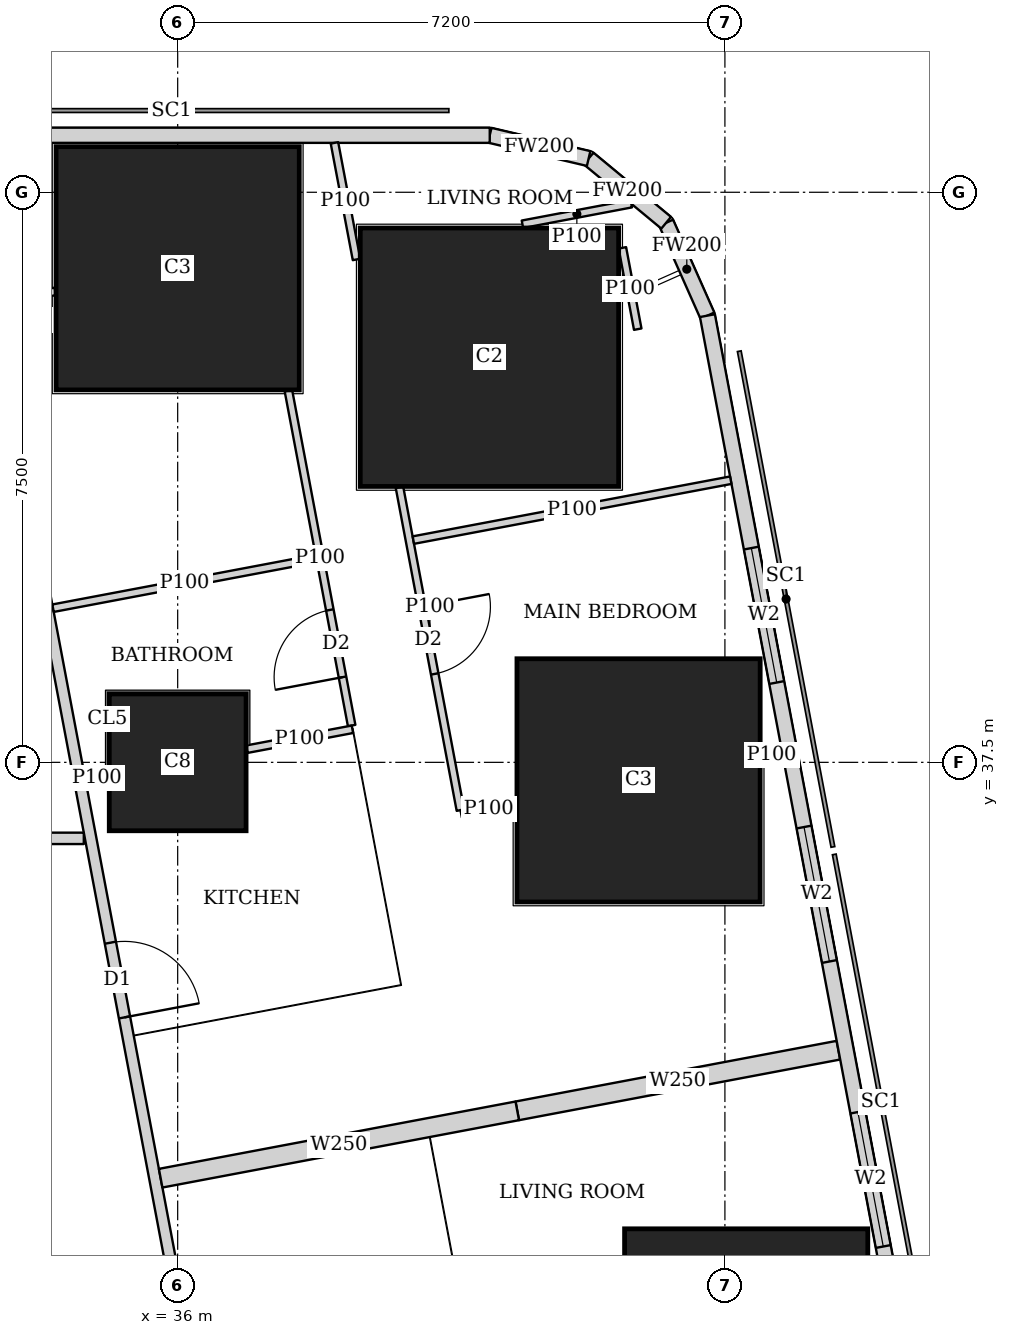
"""IFC4 building model, lengths in metres.
Left out: names, types, materials, properties, quantities, classifications, styles, units other than length and angle.
Written with IfcOpenShell. Run it as: python <this file> out.ifc"""

import sys

from ifc_helpers import new_model, si_unit, direction, frame, frame_2d, origin, origin_2d, place, context, subcontext, project, spatial, rectangle, extrude, element, fill, save


model = new_model("IFC4")
c1 = context("Model", 3, precision=1e-05, world=origin(), true_north=direction((0.0, 1.0)))
c2 = subcontext(c1, "Body", "Model", "MODEL_VIEW")
j1 = project(units=[si_unit("LENGTHUNIT", "METRE"), si_unit("PLANEANGLEUNIT", "RADIAN")], contexts=[c1])
p1 = place(None, origin())
s1 = spatial("IfcSite", under=j1, at=p1, CompositionType="ELEMENT")
p2 = place(p1, origin())
s2 = spatial("IfcBuilding", under=s1, at=p2, CompositionType="ELEMENT")
p3 = place(p2, frame((0.0, 0.0, 23.75)))
s3 = spatial("IfcBuildingStorey", under=s2, at=p3, CompositionType="ELEMENT", Elevation=23.75)
p4 = place(p3, frame((43.48, 29.763, 0.0), z_axis=(0.0, 0.0, 1.0), x_axis=(1.0, 0.0, 0.0)))
e1 = element("IfcColumn", 1, at=p4, inside=s3, PredefinedType="COLUMN", context=c2, shape_type="SweptSolid", body=[
    extrude(rectangle(XDim=3.2, YDim=3.2, at=origin_2d()), origin(), (0.0, 0.0, 1.0), 3.75),
])
p5 = place(p3, frame((36.0, 37.5, 0.0), z_axis=(0.0, 0.0, 1.0), x_axis=(1.0, 0.0, 0.0)))
e2 = element("IfcColumn", 2, at=p5, inside=s3, PredefinedType="COLUMN", context=c2, shape_type="SweptSolid", body=[
    extrude(rectangle(XDim=1.8, YDim=1.8, at=origin_2d()), origin(), (0.0, 0.0, 1.0), 3.75),
])
p6 = place(p3, frame((42.064, 37.263, 0.0), z_axis=(0.0, 0.0, 1.0), x_axis=(1.0, 0.0, 0.0)))
e3 = element("IfcColumn", 3, at=p6, inside=s3, PredefinedType="COLUMN", context=c2, shape_type="SweptSolid", body=[
    extrude(rectangle(XDim=3.2, YDim=3.2, at=origin_2d()), origin(), (0.0, 0.0, 1.0), 3.75),
])
p7 = place(p3, frame((40.102, 42.83, 0.0), z_axis=(0.0, 0.0, 1.0), x_axis=(1.0, 0.0, 0.0)))
e4 = element("IfcColumn", 4, at=p7, inside=s3, PredefinedType="COLUMN", context=c2, shape_type="SweptSolid", body=[
    extrude(rectangle(XDim=3.4, YDim=3.4, at=origin_2d()), origin(), (0.0, 0.0, 1.0), 3.75),
])
p8 = place(p3, frame((36.0, 44.0, 0.0), z_axis=(0.0, 0.0, 1.0), x_axis=(1.0, 0.0, 0.0)))
e5 = element("IfcColumn", 5, at=p8, inside=s3, PredefinedType="COLUMN", context=c2, shape_type="SweptSolid", body=[
    extrude(rectangle(XDim=3.2, YDim=3.2, at=origin_2d()), origin(), (0.0, 0.0, 1.0), 3.75),
])
p9 = place(p3, frame((50.653, 2.703, 0.0), z_axis=(0.0, 0.0, 1.0), x_axis=(-0.185612026696, 0.982623109613, 0.0)))
e6 = element("IfcWall", 6, at=p9, inside=s3, PredefinedType="SOLIDWALL", context=c2, shape_type="SweptSolid", body=[
    extrude(rectangle(XDim=41.393, YDim=0.2, at=frame_2d((20.697, 0.0))), origin(), (0.0, 0.0, 1.0), 3.5),
])
p10 = place(p9, frame((1.633, 0.0, 0.9)))
e7 = element("IfcOpeningElement", 7, at=p10, cuts=e6, PredefinedType="OPENING", context=c2, shape_type="SweptSolid", body=[
    extrude(rectangle(XDim=1.8, YDim=1.5, at=frame_2d((0.9, 0.75))), frame((0.0, 0.11, 0.0), z_axis=(0.0, -1.0, 0.0), x_axis=(1.0, 0.0, 0.0)), (0.0, 0.0, 1.0), 0.22),
])
p11 = place(p9, frame((6.032, 0.0, 0.9)))
e8 = element("IfcOpeningElement", 8, at=p11, cuts=e6, PredefinedType="OPENING", context=c2, shape_type="SweptSolid", body=[
    extrude(rectangle(XDim=1.8, YDim=1.5, at=frame_2d((0.9, 0.75))), frame((0.0, 0.11, 0.0), z_axis=(0.0, -1.0, 0.0), x_axis=(1.0, 0.0, 0.0)), (0.0, 0.0, 1.0), 0.22),
])
p12 = place(p9, frame((9.848, 0.0, 0.9)))
e9 = element("IfcOpeningElement", 9, at=p12, cuts=e6, PredefinedType="OPENING", context=c2, shape_type="SweptSolid", body=[
    extrude(rectangle(XDim=1.8, YDim=1.5, at=frame_2d((0.9, 0.75))), frame((0.0, 0.11, 0.0), z_axis=(0.0, -1.0, 0.0), x_axis=(1.0, 0.0, 0.0)), (0.0, 0.0, 1.0), 0.22),
])
p13 = place(p9, frame((17.481, 0.0, 0.9)))
e10 = element("IfcOpeningElement", 10, at=p13, cuts=e6, PredefinedType="OPENING", context=c2, shape_type="SweptSolid", body=[
    extrude(rectangle(XDim=1.8, YDim=1.5, at=frame_2d((0.9, 0.75))), frame((0.0, 0.11, 0.0), z_axis=(0.0, -1.0, 0.0), x_axis=(1.0, 0.0, 0.0)), (0.0, 0.0, 1.0), 0.22),
])
p14 = place(p9, frame((21.297, 0.0, 0.9)))
e11 = element("IfcOpeningElement", 11, at=p14, cuts=e6, PredefinedType="OPENING", context=c2, shape_type="SweptSolid", body=[
    extrude(rectangle(XDim=1.8, YDim=1.5, at=frame_2d((0.9, 0.75))), frame((0.0, 0.11, 0.0), z_axis=(0.0, -1.0, 0.0), x_axis=(1.0, 0.0, 0.0)), (0.0, 0.0, 1.0), 0.22),
])
p15 = place(p9, frame((25.113, 0.0, 0.9)))
e12 = element("IfcOpeningElement", 12, at=p15, cuts=e6, PredefinedType="OPENING", context=c2, shape_type="SweptSolid", body=[
    extrude(rectangle(XDim=1.8, YDim=1.5, at=frame_2d((0.9, 0.75))), frame((0.0, 0.11, 0.0), z_axis=(0.0, -1.0, 0.0), x_axis=(1.0, 0.0, 0.0)), (0.0, 0.0, 1.0), 0.22),
])
p16 = place(p9, frame((28.93, 0.0, 0.9)))
e13 = element("IfcOpeningElement", 13, at=p16, cuts=e6, PredefinedType="OPENING", context=c2, shape_type="SweptSolid", body=[
    extrude(rectangle(XDim=1.8, YDim=1.5, at=frame_2d((0.9, 0.75))), frame((0.0, 0.11, 0.0), z_axis=(0.0, -1.0, 0.0), x_axis=(1.0, 0.0, 0.0)), (0.0, 0.0, 1.0), 0.22),
])
p17 = place(p9, frame((32.746, 0.0, 0.9)))
e14 = element("IfcOpeningElement", 14, at=p17, cuts=e6, PredefinedType="OPENING", context=c2, shape_type="SweptSolid", body=[
    extrude(rectangle(XDim=1.8, YDim=1.5, at=frame_2d((0.9, 0.75))), frame((0.0, 0.11, 0.0), z_axis=(0.0, -1.0, 0.0), x_axis=(1.0, 0.0, 0.0)), (0.0, 0.0, 1.0), 0.22),
])
p18 = place(p9, frame((36.481, 0.0, 0.9)))
e15 = element("IfcOpeningElement", 15, at=p18, cuts=e6, PredefinedType="OPENING", context=c2, shape_type="SweptSolid", body=[
    extrude(rectangle(XDim=1.8, YDim=1.5, at=frame_2d((0.9, 0.75))), frame((0.0, 0.11, 0.0), z_axis=(0.0, -1.0, 0.0), x_axis=(1.0, 0.0, 0.0)), (0.0, 0.0, 1.0), 0.22),
])
p19 = place(p3, frame((42.97, 43.377, 0.0), z_axis=(0.0, 0.0, 1.0), x_axis=(-0.406002956633, 0.913871762998, 0.0)))
e16 = element("IfcWall", 16, at=p19, inside=s3, PredefinedType="SOLIDWALL", context=c2, shape_type="SweptSolid", body=[
    extrude(rectangle(XDim=1.337, YDim=0.2, at=frame_2d((0.669, 0.0))), origin(), (0.0, 0.0, 1.0), 3.5),
])
p20 = place(p3, frame((42.427, 44.599, 0.0), z_axis=(0.0, 0.0, 1.0), x_axis=(-0.770091412544, 0.637933551655, 0.0)))
e17 = element("IfcWall", 17, at=p20, inside=s3, PredefinedType="SOLIDWALL", context=c2, shape_type="SweptSolid", body=[
    extrude(rectangle(XDim=1.324, YDim=0.2, at=frame_2d((0.662, 0.0))), origin(), (0.0, 0.0, 1.0), 3.5),
])
p21 = place(p3, frame((41.407, 45.444, 0.0), z_axis=(0.0, 0.0, 1.0), x_axis=(-0.973453091607, 0.228886606077, 0.0)))
e18 = element("IfcWall", 18, at=p21, inside=s3, PredefinedType="SOLIDWALL", context=c2, shape_type="SweptSolid", body=[
    extrude(rectangle(XDim=1.336, YDim=0.2, at=frame_2d((0.668, 0.0))), origin(), (0.0, 0.0, 1.0), 3.5),
])
p22 = place(p3, frame((40.106, 45.75, 0.0), z_axis=(0.0, 0.0, 1.0), x_axis=(-1.0, 0.0, 0.0)))
e19 = element("IfcWall", 19, at=p22, inside=s3, PredefinedType="SOLIDWALL", context=c2, shape_type="SweptSolid", body=[
    extrude(rectangle(XDim=37.943, YDim=0.2, at=frame_2d((18.971, 0.0))), origin(), (0.0, 0.0, 1.0), 3.5),
])
p23 = place(p22, frame((8.606, 0.0, 0.9)))
e20 = element("IfcOpeningElement", 20, at=p23, cuts=e19, PredefinedType="OPENING", context=c2, shape_type="SweptSolid", body=[
    extrude(rectangle(XDim=1.8, YDim=1.5, at=frame_2d((0.9, 0.75))), frame((0.0, 0.11, 0.0), z_axis=(0.0, -1.0, 0.0), x_axis=(1.0, 0.0, 0.0)), (0.0, 0.0, 1.0), 0.22),
])
p24 = place(p22, frame((12.206, 0.0, 0.9)))
e21 = element("IfcOpeningElement", 21, at=p24, cuts=e19, PredefinedType="OPENING", context=c2, shape_type="SweptSolid", body=[
    extrude(rectangle(XDim=1.8, YDim=1.5, at=frame_2d((0.9, 0.75))), frame((0.0, 0.11, 0.0), z_axis=(0.0, -1.0, 0.0), x_axis=(1.0, 0.0, 0.0)), (0.0, 0.0, 1.0), 0.22),
])
p25 = place(p22, frame((15.806, 0.0, 0.9)))
e22 = element("IfcOpeningElement", 22, at=p25, cuts=e19, PredefinedType="OPENING", context=c2, shape_type="SweptSolid", body=[
    extrude(rectangle(XDim=1.8, YDim=1.5, at=frame_2d((0.9, 0.75))), frame((0.0, 0.11, 0.0), z_axis=(0.0, -1.0, 0.0), x_axis=(1.0, 0.0, 0.0)), (0.0, 0.0, 1.0), 0.22),
])
p26 = place(p22, frame((19.406, 0.0, 0.9)))
e23 = element("IfcOpeningElement", 23, at=p26, cuts=e19, PredefinedType="OPENING", context=c2, shape_type="SweptSolid", body=[
    extrude(rectangle(XDim=1.8, YDim=1.5, at=frame_2d((0.9, 0.75))), frame((0.0, 0.11, 0.0), z_axis=(0.0, -1.0, 0.0), x_axis=(1.0, 0.0, 0.0)), (0.0, 0.0, 1.0), 0.22),
])
p27 = place(p22, frame((23.006, 0.0, 0.9)))
e24 = element("IfcOpeningElement", 24, at=p27, cuts=e19, PredefinedType="OPENING", context=c2, shape_type="SweptSolid", body=[
    extrude(rectangle(XDim=1.8, YDim=1.5, at=frame_2d((0.9, 0.75))), frame((0.0, 0.11, 0.0), z_axis=(0.0, -1.0, 0.0), x_axis=(1.0, 0.0, 0.0)), (0.0, 0.0, 1.0), 0.22),
])
p28 = place(p22, frame((26.606, 0.0, 0.9)))
e25 = element("IfcOpeningElement", 25, at=p28, cuts=e19, PredefinedType="OPENING", context=c2, shape_type="SweptSolid", body=[
    extrude(rectangle(XDim=1.8, YDim=1.5, at=frame_2d((0.9, 0.75))), frame((0.0, 0.11, 0.0), z_axis=(0.0, -1.0, 0.0), x_axis=(1.0, 0.0, 0.0)), (0.0, 0.0, 1.0), 0.22),
])
p29 = place(p3, frame((8.35, 36.5, 0.0), z_axis=(0.0, 0.0, 1.0), x_axis=(1.0, 0.0, 0.0)))
e26 = element("IfcWall", 26, at=p29, inside=s3, PredefinedType="SOLIDWALL", context=c2, shape_type="SweptSolid", body=[
    extrude(rectangle(XDim=26.415, YDim=0.15, at=frame_2d((13.208, 0.0))), origin(), (0.0, 0.0, 1.0), 3.5),
])
p30 = place(p29, frame((3.383, 0.0, 0.0)))
e27 = element("IfcOpeningElement", 27, at=p30, cuts=e26, PredefinedType="OPENING", context=c2, shape_type="SweptSolid", body=[
    extrude(rectangle(XDim=1.0, YDim=2.1, at=frame_2d((0.5, 1.05))), frame((0.0, 0.085, 0.0), z_axis=(0.0, -1.0, 0.0), x_axis=(1.0, 0.0, 0.0)), (0.0, 0.0, 1.0), 0.17),
])
p31 = place(p29, frame((7.65, 0.0, 0.0)))
e28 = element("IfcOpeningElement", 28, at=p31, cuts=e26, PredefinedType="OPENING", context=c2, shape_type="SweptSolid", body=[
    extrude(rectangle(XDim=1.0, YDim=2.1, at=frame_2d((0.5, 1.05))), frame((0.0, 0.085, 0.0), z_axis=(0.0, -1.0, 0.0), x_axis=(1.0, 0.0, 0.0)), (0.0, 0.0, 1.0), 0.17),
])
p32 = place(p29, frame((14.857, 0.0, 0.0)))
e29 = element("IfcOpeningElement", 29, at=p32, cuts=e26, PredefinedType="OPENING", context=c2, shape_type="SweptSolid", body=[
    extrude(rectangle(XDim=1.0, YDim=2.1, at=frame_2d((0.5, 1.05))), frame((0.0, 0.085, 0.0), z_axis=(0.0, -1.0, 0.0), x_axis=(1.0, 0.0, 0.0)), (0.0, 0.0, 1.0), 0.17),
])
p33 = place(p3, frame((33.755, 42.325, 0.0), z_axis=(0.0, 0.0, 1.0), x_axis=(0.185611461091, -0.982623216453, 0.0)))
e30 = element("IfcWall", 30, at=p33, inside=s3, PredefinedType="SOLIDWALL", context=c2, shape_type="SweptSolid", body=[
    extrude(rectangle(XDim=40.241, YDim=0.15, at=frame_2d((20.121, 0.0))), origin(), (0.0, 0.0, 1.0), 2.5),
])
p34 = place(p33, frame((7.325, 0.0, 0.0)))
e31 = element("IfcOpeningElement", 31, at=p34, cuts=e30, PredefinedType="OPENING", context=c2, shape_type="SweptSolid", body=[
    extrude(rectangle(XDim=1.0, YDim=2.1, at=frame_2d((0.5, 1.05))), frame((0.0, 0.085, 0.0), z_axis=(0.0, -1.0, 0.0), x_axis=(1.0, 0.0, 0.0)), (0.0, 0.0, 1.0), 0.17),
])
p35 = place(p33, frame((11.902, 0.0, 0.0)))
e32 = element("IfcOpeningElement", 32, at=p35, cuts=e30, PredefinedType="OPENING", context=c2, shape_type="SweptSolid", body=[
    extrude(rectangle(XDim=1.0, YDim=2.1, at=frame_2d((0.5, 1.05))), frame((0.0, 0.085, 0.0), z_axis=(0.0, -1.0, 0.0), x_axis=(1.0, 0.0, 0.0)), (0.0, 0.0, 1.0), 0.17),
])
p36 = place(p33, frame((25.718, 0.0, 0.0)))
e33 = element("IfcOpeningElement", 33, at=p36, cuts=e30, PredefinedType="OPENING", context=c2, shape_type="SweptSolid", body=[
    extrude(rectangle(XDim=1.0, YDim=2.1, at=frame_2d((0.5, 1.05))), frame((0.0, 0.085, 0.0), z_axis=(0.0, -1.0, 0.0), x_axis=(1.0, 0.0, 0.0)), (0.0, 0.0, 1.0), 0.17),
])
p37 = place(p33, frame((31.788, 0.0, 0.0)))
e34 = element("IfcOpeningElement", 34, at=p37, cuts=e30, PredefinedType="OPENING", context=c2, shape_type="SweptSolid", body=[
    extrude(rectangle(XDim=1.0, YDim=2.1, at=frame_2d((0.5, 1.05))), frame((0.0, 0.085, 0.0), z_axis=(0.0, -1.0, 0.0), x_axis=(1.0, 0.0, 0.0)), (0.0, 0.0, 1.0), 0.17),
])
p38 = place(p3, frame((41.851, 44.269, 0.0), z_axis=(0.0, 0.0, 1.0), x_axis=(0.185411943936, -0.982660883034, 0.0)))
e35 = element("IfcWall", 35, at=p38, inside=s3, PredefinedType="PARTITIONING", context=c2, shape_type="SweptSolid", body=[
    extrude(rectangle(XDim=1.089, YDim=0.1, at=frame_2d((0.544, 0.0))), origin(), (0.0, 0.0, 1.0), 3.5),
])
p39 = place(p3, frame((38.063, 45.65, 0.0), z_axis=(0.0, 0.0, 1.0), x_axis=(0.185789650565, -0.982589540827, 0.0)))
e36 = element("IfcWall", 36, at=p39, inside=s3, PredefinedType="PARTITIONING", context=c2, shape_type="SweptSolid", body=[
    extrude(rectangle(XDim=1.561, YDim=0.1, at=frame_2d((0.781, 0.0))), origin(), (0.0, 0.0, 1.0), 3.5),
])
p40 = place(p3, frame((38.918, 41.12, 0.0), z_axis=(0.0, 0.0, 1.0), x_axis=(0.185474723155, -0.982649035552, 0.0)))
e37 = element("IfcWall", 37, at=p40, inside=s3, PredefinedType="PARTITIONING", context=c2, shape_type="SweptSolid", body=[
    extrude(rectangle(XDim=4.324, YDim=0.1, at=frame_2d((2.162, 0.0))), origin(), (0.0, 0.0, 1.0), 3.5),
])
p41 = place(p40, frame((1.6, 0.0, 0.0)))
e38 = element("IfcOpeningElement", 38, at=p41, cuts=e37, PredefinedType="OPENING", context=c2, shape_type="SweptSolid", body=[
    extrude(rectangle(XDim=0.9, YDim=2.1, at=frame_2d((0.45, 1.05))), frame((0.0, 0.06, 0.0), z_axis=(0.0, -1.0, 0.0), x_axis=(1.0, 0.0, 0.0)), (0.0, 0.0, 1.0), 0.12),
])
p42 = place(p3, frame((37.457, 42.39, 0.0), z_axis=(0.0, 0.0, 1.0), x_axis=(0.185560627322, -0.982632817276, 0.0)))
e39 = element("IfcWall", 39, at=p42, inside=s3, PredefinedType="PARTITIONING", context=c2, shape_type="SweptSolid", body=[
    extrude(rectangle(XDim=4.484, YDim=0.1, at=frame_2d((2.242, 0.0))), origin(), (0.0, 0.0, 1.0), 3.5),
])
p43 = place(p42, frame((2.936, 0.0, 0.0)))
e40 = element("IfcOpeningElement", 40, at=p43, cuts=e39, PredefinedType="OPENING", context=c2, shape_type="SweptSolid", body=[
    extrude(rectangle(XDim=0.9, YDim=2.1, at=frame_2d((0.45, 1.05))), frame((0.0, 0.06, 0.0), z_axis=(0.0, -1.0, 0.0), x_axis=(1.0, 0.0, 0.0)), (0.0, 0.0, 1.0), 0.12),
])
p44 = place(p3, frame((41.968, 44.85, 0.0), z_axis=(0.0, 0.0, 1.0), x_axis=(-0.982563630066, -0.185926633033, 0.0)))
e41 = element("IfcWall", 41, at=p44, inside=s3, PredefinedType="PARTITIONING", context=c2, shape_type="SweptSolid", body=[
    extrude(rectangle(XDim=1.458, YDim=0.1, at=frame_2d((0.729, 0.0))), origin(), (0.0, 0.0, 1.0), 3.5),
])
p45 = place(p3, frame((43.277, 41.212, 0.0), z_axis=(0.0, 0.0, 1.0), x_axis=(-0.982665405803, -0.185387972203, 0.0)))
e42 = element("IfcWall", 42, at=p45, inside=s3, PredefinedType="PARTITIONING", context=c2, shape_type="SweptSolid", body=[
    extrude(rectangle(XDim=4.25, YDim=0.1, at=frame_2d((2.125, 0.0))), origin(), (0.0, 0.0, 1.0), 2.1),
])
p46 = place(p3, frame((43.955, 37.62, 0.0), z_axis=(0.0, 0.0, 1.0), x_axis=(-0.982532299353, -0.186092129678, 0.0)))
e43 = element("IfcWall", 43, at=p46, inside=s3, PredefinedType="PARTITIONING", context=c2, shape_type="SweptSolid", body=[
    extrude(rectangle(XDim=0.286, YDim=0.1, at=frame_2d((0.143, 0.0))), origin(), (0.0, 0.0, 1.0), 3.5),
])
p47 = place(p3, frame((40.454, 36.959, 0.0), z_axis=(0.0, 0.0, 1.0), x_axis=(-0.982578421631, -0.185848447247, 0.0)))
e44 = element("IfcWall", 44, at=p47, inside=s3, PredefinedType="PARTITIONING", context=c2, shape_type="SweptSolid", body=[
    extrude(rectangle(XDim=0.737, YDim=0.1, at=frame_2d((0.369, 0.0))), origin(), (0.0, 0.0, 1.0), 3.5),
])
p48 = place(p3, frame((34.39, 43.696, 0.0), z_axis=(0.0, 0.0, 1.0), x_axis=(-0.982640737979, -0.185518678479, 0.0)))
e45 = element("IfcWall", 45, at=p48, inside=s3, PredefinedType="PARTITIONING", context=c2, shape_type="SweptSolid", body=[
    extrude(rectangle(XDim=0.803, YDim=0.1, at=frame_2d((0.401, 0.0))), origin(), (0.0, 0.0, 1.0), 2.05),
])
p49 = place(p3, frame((37.823, 40.182, 0.0), z_axis=(0.0, 0.0, 1.0), x_axis=(-0.98263926043, -0.185526504472, 0.0)))
e46 = element("IfcWall", 46, at=p49, inside=s3, PredefinedType="PARTITIONING", context=c2, shape_type="SweptSolid", body=[
    extrude(rectangle(XDim=3.524, YDim=0.1, at=frame_2d((1.762, 0.0))), origin(), (0.0, 0.0, 1.0), 3.5),
])
p50 = place(p3, frame((38.299, 37.935, 0.0), z_axis=(0.0, 0.0, 1.0), x_axis=(-0.982680053146, -0.185310315822, 0.0)))
e47 = element("IfcWall", 47, at=p50, inside=s3, PredefinedType="PARTITIONING", context=c2, shape_type="SweptSolid", body=[
    extrude(rectangle(XDim=1.414, YDim=0.1, at=frame_2d((0.707, 0.0))), origin(), (0.0, 0.0, 1.0), 3.5),
])
p51 = place(p3, frame((35.09, 37.328, 0.0), z_axis=(0.0, 0.0, 1.0), x_axis=(-0.982961380226, -0.183812200315, 0.0)))
e48 = element("IfcWall", 48, at=p51, inside=s3, PredefinedType="PARTITIONING", context=c2, shape_type="SweptSolid", body=[
    extrude(rectangle(XDim=0.31, YDim=0.1, at=frame_2d((0.155, 0.0))), origin(), (0.0, 0.0, 1.0), 3.5),
])
p52 = place(p3, frame((44.693, 33.713, 0.0), z_axis=(0.0, 0.0, 1.0), x_axis=(-0.982633535512, -0.185556823879, 0.0)))
e49 = element("IfcWall", 49, at=p52, inside=s3, PredefinedType="SOLIDWALL", context=c2, shape_type="SweptSolid", body=[
    extrude(rectangle(XDim=4.3, YDim=0.25, at=frame_2d((2.15, 0.0))), origin(), (0.0, 0.0, 1.0), 2.05),
])
p53 = place(p3, frame((40.468, 32.915, 0.0), z_axis=(0.0, 0.0, 1.0), x_axis=(-0.982635807605, -0.185544791394, 0.0)))
e50 = element("IfcWall", 50, at=p53, inside=s3, PredefinedType="SOLIDWALL", context=c2, shape_type="SweptSolid", body=[
    extrude(rectangle(XDim=4.775, YDim=0.25, at=frame_2d((2.388, 0.0))), origin(), (0.0, 0.0, 1.0), 3.5),
])
p54 = place(p16, origin())
e51 = element("IfcWindow", 51, at=p54, inside=s3, PartitioningType="SINGLE_PANEL", PredefinedType="WINDOW", context=c2, shape_type="SweptSolid", body=[
    extrude(rectangle(XDim=1.8, YDim=1.5, at=frame_2d((0.9, 0.75))), frame((0.0, 0.03, 0.0), z_axis=(0.0, -1.0, 0.0), x_axis=(1.0, 0.0, 0.0)), (0.0, 0.0, 1.0), 0.06),
])
fill(e13, e51)
p55 = place(p17, origin())
e52 = element("IfcWindow", 52, at=p55, inside=s3, PartitioningType="SINGLE_PANEL", PredefinedType="WINDOW", context=c2, shape_type="SweptSolid", body=[
    extrude(rectangle(XDim=1.8, YDim=1.5, at=frame_2d((0.9, 0.75))), frame((0.0, 0.03, 0.0), z_axis=(0.0, -1.0, 0.0), x_axis=(1.0, 0.0, 0.0)), (0.0, 0.0, 1.0), 0.06),
])
fill(e14, e52)
p56 = place(p18, origin())
e53 = element("IfcWindow", 53, at=p56, inside=s3, PartitioningType="SINGLE_PANEL", PredefinedType="WINDOW", context=c2, shape_type="SweptSolid", body=[
    extrude(rectangle(XDim=1.8, YDim=1.5, at=frame_2d((0.9, 0.75))), frame((0.0, 0.03, 0.0), z_axis=(0.0, -1.0, 0.0), x_axis=(1.0, 0.0, 0.0)), (0.0, 0.0, 1.0), 0.06),
])
fill(e15, e53)
p57 = place(p41, origin())
e54 = element("IfcDoor", 54, at=p57, inside=s3, OperationType="SINGLE_SWING_LEFT", PredefinedType="DOOR", context=c2, shape_type="SweptSolid", body=[
    extrude(rectangle(XDim=0.9, YDim=2.1, at=frame_2d((0.45, 1.05))), frame((0.0, 0.025, 0.0), z_axis=(0.0, -1.0, 0.0), x_axis=(1.0, 0.0, 0.0)), (0.0, 0.0, 1.0), 0.05),
])
fill(e38, e54)
p58 = place(p43, origin())
e55 = element("IfcDoor", 55, at=p58, inside=s3, OperationType="SINGLE_SWING_LEFT", PredefinedType="DOOR", context=c2, shape_type="SweptSolid", body=[
    extrude(rectangle(XDim=0.9, YDim=2.1, at=frame_2d((0.45, 1.05))), frame((0.0, 0.025, 0.0), z_axis=(0.0, -1.0, 0.0), x_axis=(1.0, 0.0, 0.0)), (0.0, 0.0, 1.0), 0.05),
])
fill(e40, e55)
p59 = place(p34, origin())
e56 = element("IfcDoor", 56, at=p59, inside=s3, OperationType="SINGLE_SWING_RIGHT", PredefinedType="DOOR", context=c2, shape_type="SweptSolid", body=[
    extrude(rectangle(XDim=1.0, YDim=2.1, at=frame_2d((0.5, 1.05))), frame((0.0, 0.025, 0.0), z_axis=(0.0, -1.0, 0.0), x_axis=(1.0, 0.0, 0.0)), (0.0, 0.0, 1.0), 0.05),
])
fill(e31, e56)
save(model, sys.argv[1])
